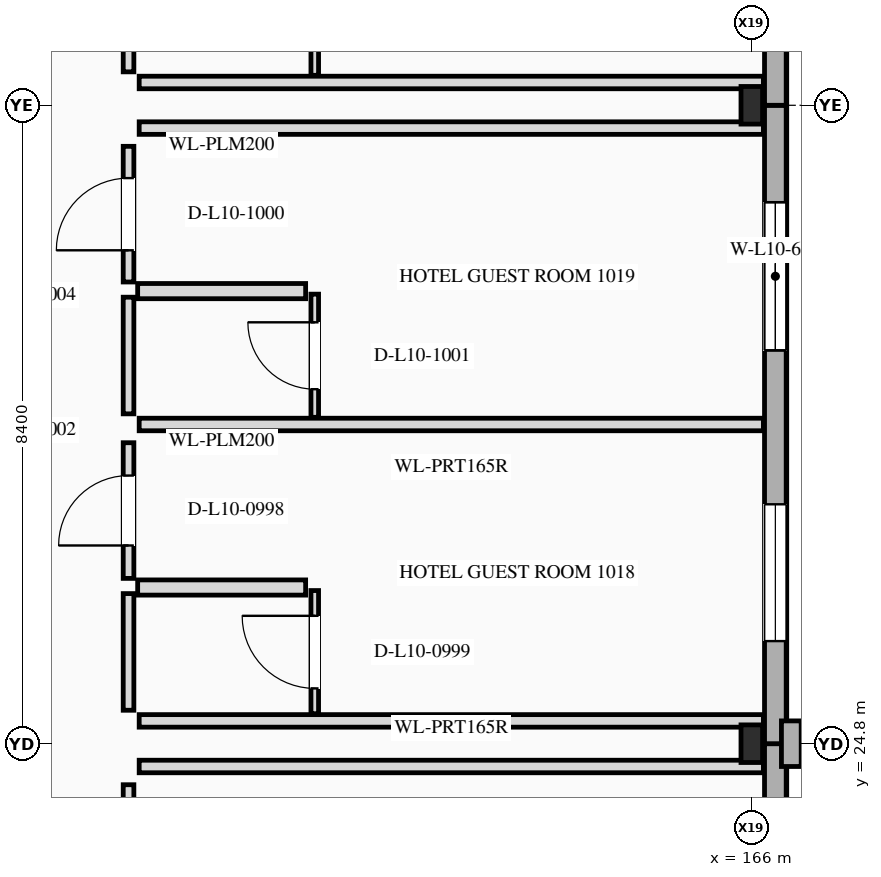
"""IFC4 building model, lengths in metres.
Left out: names, types, materials, properties, quantities, classifications, styles, units other than length and angle.
Written with IfcOpenShell. Run it as: python <this file> out.ifc"""

import sys

from ifc_helpers import new_model, si_unit, direction, frame, frame_2d, origin, origin_2d, place, context, subcontext, project, spatial, rectangle, i_section, extrude, element, fill, save


model = new_model("IFC4")
c1 = context("Model", 3, precision=1e-05, world=origin(), true_north=direction((0.0, 1.0)))
c2 = subcontext(c1, "Body", "Model", "MODEL_VIEW")
j1 = project(units=[si_unit("LENGTHUNIT", "METRE"), si_unit("PLANEANGLEUNIT", "RADIAN")], contexts=[c1])
p1 = place(None, origin())
s1 = spatial("IfcSite", under=j1, at=p1, CompositionType="ELEMENT")
p2 = place(p1, origin())
s2 = spatial("IfcBuilding", under=s1, at=p2, CompositionType="ELEMENT")
p3 = place(p2, frame((0.0, 0.0, 41.1)))
s3 = spatial("IfcBuildingStorey", under=s2, at=p3, CompositionType="ELEMENT", Elevation=41.1)
for number, where, z_axis, x_axis in (
    (1, (166.0, 24.8, 0.0), (0.0, 0.0, 1.0), (1.0, 0.0, 0.0)),
    (2, (166.0, 33.2, 0.0), (0.0, 0.0, 1.0), (1.0, 0.0, 0.0)),
):
    element("IfcColumn", number, at=place(p3, frame(where, z_axis=z_axis, x_axis=x_axis)), inside=s3, PredefinedType="COLUMN", context=c2, shape_type="SweptSolid", body=[
        extrude(i_section(OverallWidth=0.284, OverallDepth=0.495, WebThickness=0.019, FlangeThickness=0.033, at=origin_2d()), origin(), (0.0, 0.0, 1.0), 3.5),
    ])
p4 = place(p3, frame((166.31, 18.8, 0.0), z_axis=(0.0, 0.0, 1.0), x_axis=(0.0, 1.0, 0.0)))
e3 = element("IfcWall", 3, at=p4, inside=s3, PredefinedType="STANDARD", context=c2, shape_type="SweptSolid", body=[
    extrude(rectangle(XDim=6.0, YDim=0.285, at=frame_2d((3.0, 0.0))), origin(), (0.0, 0.0, 1.0), 3.5),
])
p5 = place(p4, frame((2.45, 0.0, 0.85)))
e4 = element("IfcOpeningElement", 4, at=p5, cuts=e3, PredefinedType="OPENING", context=c2, shape_type="SweptSolid", body=[
    extrude(rectangle(XDim=1.1, YDim=1.5, at=frame_2d((0.55, 0.75))), frame((0.0, 0.152, 0.0), z_axis=(0.0, -1.0, 0.0), x_axis=(1.0, 0.0, 0.0)), (0.0, 0.0, 1.0), 0.305),
])
p6 = place(p3, frame((166.31, 24.8, 0.0), z_axis=(0.0, 0.0, 1.0), x_axis=(0.0, 1.0, 0.0)))
e5 = element("IfcWall", 5, at=p6, inside=s3, PredefinedType="STANDARD", context=c2, shape_type="SweptSolid", body=[
    extrude(rectangle(XDim=8.4, YDim=0.285, at=frame_2d((4.2, 0.0))), origin(), (0.0, 0.0, 1.0), 3.5),
])
p7 = place(p6, frame((1.35, 0.0, 0.85)))
e6 = element("IfcOpeningElement", 6, at=p7, cuts=e5, PredefinedType="OPENING", context=c2, shape_type="SweptSolid", body=[
    extrude(rectangle(XDim=1.8, YDim=1.8, at=frame_2d((0.9, 0.9))), frame((0.0, 0.152, 0.0), z_axis=(0.0, -1.0, 0.0), x_axis=(1.0, 0.0, 0.0)), (0.0, 0.0, 1.0), 0.305),
])
p8 = place(p6, frame((5.175, 0.0, 0.85)))
e7 = element("IfcOpeningElement", 7, at=p8, cuts=e5, PredefinedType="OPENING", context=c2, shape_type="SweptSolid", body=[
    extrude(rectangle(XDim=1.95, YDim=1.85, at=frame_2d((0.975, 0.925))), frame((0.0, 0.152, 0.0), z_axis=(0.0, -1.0, 0.0), x_axis=(1.0, 0.0, 0.0)), (0.0, 0.0, 1.0), 0.305),
])
p9 = place(p3, frame((166.52, 24.5, 0.0), z_axis=(0.0, 0.0, 1.0), x_axis=(0.0, 1.0, 0.0)))
e8 = element("IfcWall", 8, at=p9, inside=s3, PredefinedType="ELEMENTEDWALL", context=c2, shape_type="SweptSolid", body=[
    extrude(rectangle(XDim=0.6, YDim=0.26, at=frame_2d((0.3, 0.0))), origin(), (0.0, 0.0, 1.0), 3.5),
])
p10 = place(p3, frame((166.31, 33.2, 0.0), z_axis=(0.0, 0.0, 1.0), x_axis=(0.0, 1.0, 0.0)))
e9 = element("IfcWall", 9, at=p10, inside=s3, PredefinedType="STANDARD", context=c2, shape_type="SweptSolid", body=[
    extrude(rectangle(XDim=1.34, YDim=0.285, at=frame_2d((0.67, 0.0))), origin(), (0.0, 0.0, 1.0), 3.5),
])
p11 = place(p3, frame((157.8, 21.37, 0.0), z_axis=(0.0, 0.0, 1.0), x_axis=(0.0, 1.0, 0.0)))
e10 = element("IfcWall", 10, at=p11, inside=s3, PredefinedType="PARTITIONING", context=c2, shape_type="SweptSolid", body=[
    extrude(rectangle(XDim=2.89, YDim=0.14, at=frame_2d((1.445, 0.0))), origin(), (0.0, 0.0, 1.0), 2.738),
])
p12 = place(p11, frame((0.925, 0.0, 0.0)))
e11 = element("IfcOpeningElement", 11, at=p12, cuts=e10, PredefinedType="OPENING", context=c2, shape_type="SweptSolid", body=[
    extrude(rectangle(XDim=1.04, YDim=2.25, at=frame_2d((0.52, 1.125))), frame((0.0, 0.08, 0.0), z_axis=(0.0, -1.0, 0.0), x_axis=(1.0, 0.0, 0.0)), (0.0, 0.0, 1.0), 0.16),
])
p13 = place(p3, frame((157.94, 24.5, 0.0), z_axis=(0.0, 0.0, 1.0), x_axis=(1.0, 0.0, 0.0)))
e12 = element("IfcWall", 12, at=p13, inside=s3, PredefinedType="PARTITIONING", context=c2, shape_type="SweptSolid", body=[
    extrude(rectangle(XDim=8.213, YDim=0.165, at=frame_2d((4.106, 0.0))), origin(), (0.0, 0.0, 1.0), 2.57),
])
p14 = place(p3, frame((157.8, 25.24, 0.0), z_axis=(0.0, 0.0, 1.0), x_axis=(0.0, 1.0, 0.0)))
e13 = element("IfcWall", 13, at=p14, inside=s3, PredefinedType="PARTITIONING", context=c2, shape_type="SweptSolid", body=[
    extrude(rectangle(XDim=1.535, YDim=0.14, at=frame_2d((0.768, 0.0))), origin(), (0.0, 0.0, 1.0), 2.738),
])
p15 = place(p3, frame((157.8, 26.975, 0.0), z_axis=(0.0, 0.0, 1.0), x_axis=(0.0, 1.0, 0.0)))
e14 = element("IfcWall", 14, at=p15, inside=s3, PredefinedType="PARTITIONING", context=c2, shape_type="SweptSolid", body=[
    extrude(rectangle(XDim=1.785, YDim=0.14, at=frame_2d((0.893, 0.0))), origin(), (0.0, 0.0, 1.0), 2.738),
])
p16 = place(p15, frame((0.433, 0.0, 0.0)))
e15 = element("IfcOpeningElement", 15, at=p16, cuts=e14, PredefinedType="OPENING", context=c2, shape_type="SweptSolid", body=[
    extrude(rectangle(XDim=0.92, YDim=2.3, at=frame_2d((0.46, 1.15))), frame((0.0, 0.08, 0.0), z_axis=(0.0, -1.0, 0.0), x_axis=(1.0, 0.0, 0.0)), (0.0, 0.0, 1.0), 0.16),
])
for number, where, z_axis, x_axis in (
    (16, (157.94, 25.1, 0.0), (0.0, 0.0, 1.0), (1.0, 0.0, 0.0)),
    (17, (157.94, 29.0, 0.0), (0.0, 0.0, 1.0), (1.0, 0.0, 0.0)),
):
    element("IfcWall", number, at=place(p3, frame(where, z_axis=z_axis, x_axis=x_axis)), inside=s3, PredefinedType="PARTITIONING", context=c2, shape_type="SweptSolid", body=[
        extrude(rectangle(XDim=8.213, YDim=0.165, at=frame_2d((4.106, 0.0))), origin(), (0.0, 0.0, 1.0), 2.57),
    ])
p17 = place(p3, frame((157.92, 26.855, 0.0), z_axis=(0.0, 0.0, 1.0), x_axis=(1.0, 0.0, 0.0)))
e18 = element("IfcWall", 18, at=p17, inside=s3, PredefinedType="PLUMBINGWALL", context=c2, shape_type="SweptSolid", body=[
    extrude(rectangle(XDim=2.21, YDim=0.2, at=frame_2d((1.105, 0.0))), origin(), (0.0, 0.0, 1.0), 3.18),
])
p18 = place(p3, frame((160.25, 25.195, 0.0), z_axis=(0.0, 0.0, 1.0), x_axis=(0.0, 1.0, 0.0)))
e19 = element("IfcWall", 19, at=p18, inside=s3, PredefinedType="PARTITIONING", context=c2, shape_type="SweptSolid", body=[
    extrude(rectangle(XDim=1.62, YDim=0.1, at=frame_2d((0.81, 0.0))), origin(), (0.0, 0.0, 1.0), 2.738),
])
p19 = place(p18, frame((0.333, 0.0, 0.0)))
e20 = element("IfcOpeningElement", 20, at=p19, cuts=e19, PredefinedType="OPENING", context=c2, shape_type="SweptSolid", body=[
    extrude(rectangle(XDim=0.955, YDim=2.14, at=frame_2d((0.478, 1.07))), frame((0.0, 0.06, 0.0), z_axis=(0.0, -1.0, 0.0), x_axis=(1.0, 0.0, 0.0)), (0.0, 0.0, 1.0), 0.12),
])
p20 = place(p3, frame((157.8, 29.14, 0.0), z_axis=(0.0, 0.0, 1.0), x_axis=(0.0, 1.0, 0.0)))
e21 = element("IfcWall", 21, at=p20, inside=s3, PredefinedType="PARTITIONING", context=c2, shape_type="SweptSolid", body=[
    extrude(rectangle(XDim=1.535, YDim=0.14, at=frame_2d((0.768, 0.0))), origin(), (0.0, 0.0, 1.0), 2.738),
])
p21 = place(p3, frame((157.8, 30.875, 0.0), z_axis=(0.0, 0.0, 1.0), x_axis=(0.0, 1.0, 0.0)))
e22 = element("IfcWall", 22, at=p21, inside=s3, PredefinedType="PARTITIONING", context=c2, shape_type="SweptSolid", body=[
    extrude(rectangle(XDim=1.785, YDim=0.14, at=frame_2d((0.893, 0.0))), origin(), (0.0, 0.0, 1.0), 2.738),
])
p22 = place(p21, frame((0.417, 0.0, 0.0)))
e23 = element("IfcOpeningElement", 23, at=p22, cuts=e22, PredefinedType="OPENING", context=c2, shape_type="SweptSolid", body=[
    extrude(rectangle(XDim=0.95, YDim=2.3, at=frame_2d((0.475, 1.15))), frame((0.0, 0.08, 0.0), z_axis=(0.0, -1.0, 0.0), x_axis=(1.0, 0.0, 0.0)), (0.0, 0.0, 1.0), 0.16),
])
p23 = place(p3, frame((157.94, 32.9, 0.0), z_axis=(0.0, 0.0, 1.0), x_axis=(1.0, 0.0, 0.0)))
e24 = element("IfcWall", 24, at=p23, inside=s3, PredefinedType="PARTITIONING", context=c2, shape_type="SweptSolid", body=[
    extrude(rectangle(XDim=8.213, YDim=0.165, at=frame_2d((4.106, 0.0))), origin(), (0.0, 0.0, 1.0), 2.57),
])
p24 = place(p3, frame((157.92, 30.755, 0.0), z_axis=(0.0, 0.0, 1.0), x_axis=(1.0, 0.0, 0.0)))
e25 = element("IfcWall", 25, at=p24, inside=s3, PredefinedType="PLUMBINGWALL", context=c2, shape_type="SweptSolid", body=[
    extrude(rectangle(XDim=2.21, YDim=0.2, at=frame_2d((1.105, 0.0))), origin(), (0.0, 0.0, 1.0), 3.18),
])
p25 = place(p3, frame((160.25, 29.094, 0.0), z_axis=(0.0, 0.0, 1.0), x_axis=(0.0, 1.0, 0.0)))
e26 = element("IfcWall", 26, at=p25, inside=s3, PredefinedType="PARTITIONING", context=c2, shape_type="SweptSolid", body=[
    extrude(rectangle(XDim=1.621, YDim=0.1, at=frame_2d((0.81, 0.0))), origin(), (0.0, 0.0, 1.0), 2.738),
])
p26 = place(p25, frame((0.37, 0.0, 0.0)))
e27 = element("IfcOpeningElement", 27, at=p26, cuts=e26, PredefinedType="OPENING", context=c2, shape_type="SweptSolid", body=[
    extrude(rectangle(XDim=0.88, YDim=2.18, at=frame_2d((0.44, 1.09))), frame((0.0, 0.06, 0.0), z_axis=(0.0, -1.0, 0.0), x_axis=(1.0, 0.0, 0.0)), (0.0, 0.0, 1.0), 0.12),
])
p27 = place(p3, frame((157.8, 33.64, 0.0), z_axis=(0.0, 0.0, 1.0), x_axis=(0.0, 1.0, 0.0)))
e28 = element("IfcWall", 28, at=p27, inside=s3, PredefinedType="PARTITIONING", context=c2, shape_type="SweptSolid", body=[
    extrude(rectangle(XDim=1.93, YDim=0.14, at=frame_2d((0.965, 0.0))), origin(), (0.0, 0.0, 1.0), 3.18),
])
p28 = place(p3, frame((157.94, 33.5, 0.0), z_axis=(0.0, 0.0, 1.0), x_axis=(1.0, 0.0, 0.0)))
e29 = element("IfcWall", 29, at=p28, inside=s3, PredefinedType="PARTITIONING", context=c2, shape_type="SweptSolid", body=[
    extrude(rectangle(XDim=8.213, YDim=0.165, at=frame_2d((4.106, 0.0))), origin(), (0.0, 0.0, 1.0), 2.57),
])
p29 = place(p3, frame((160.25, 33.594, 0.0), z_axis=(0.0, 0.0, 1.0), x_axis=(0.0, 1.0, 0.0)))
e30 = element("IfcWall", 30, at=p29, inside=s3, PredefinedType="PARTITIONING", context=c2, shape_type="SweptSolid", body=[
    extrude(rectangle(XDim=2.016, YDim=0.1, at=frame_2d((1.008, 0.0))), origin(), (0.0, 0.0, 1.0), 3.18),
])
p30 = place(p29, frame((0.53, 0.0, 0.0)))
e31 = element("IfcOpeningElement", 31, at=p30, cuts=e30, PredefinedType="OPENING", context=c2, shape_type="SweptSolid", body=[
    extrude(rectangle(XDim=0.955, YDim=2.22, at=frame_2d((0.478, 1.11))), frame((0.0, 0.06, 0.0), z_axis=(0.0, -1.0, 0.0), x_axis=(1.0, 0.0, 0.0)), (0.0, 0.0, 1.0), 0.12),
])
p31 = place(p7, origin())
e32 = element("IfcWindow", 32, at=p31, inside=s3, PartitioningType="SINGLE_PANEL", PredefinedType="WINDOW", context=c2, shape_type="SweptSolid", body=[
    extrude(rectangle(XDim=1.8, YDim=1.8, at=frame_2d((0.9, 0.9))), frame((0.0, 0.03, 0.0), z_axis=(0.0, -1.0, 0.0), x_axis=(1.0, 0.0, 0.0)), (0.0, 0.0, 1.0), 0.06),
])
fill(e6, e32)
p32 = place(p8, origin())
e33 = element("IfcWindow", 33, at=p32, inside=s3, PartitioningType="SINGLE_PANEL", PredefinedType="WINDOW", context=c2, shape_type="SweptSolid", body=[
    extrude(rectangle(XDim=1.95, YDim=1.85, at=frame_2d((0.975, 0.925))), frame((0.0, 0.03, 0.0), z_axis=(0.0, -1.0, 0.0), x_axis=(1.0, 0.0, 0.0)), (0.0, 0.0, 1.0), 0.06),
])
fill(e7, e33)
p33 = place(p16, origin())
e34 = element("IfcDoor", 34, at=p33, inside=s3, OperationType="SINGLE_SWING_LEFT", PredefinedType="DOOR", context=c2, shape_type="SweptSolid", body=[
    extrude(rectangle(XDim=0.92, YDim=2.3, at=frame_2d((0.46, 1.15))), frame((0.0, 0.025, 0.0), z_axis=(0.0, -1.0, 0.0), x_axis=(1.0, 0.0, 0.0)), (0.0, 0.0, 1.0), 0.05),
])
fill(e15, e34)
p34 = place(p19, origin())
e35 = element("IfcDoor", 35, at=p34, inside=s3, OperationType="SINGLE_SWING_RIGHT", PredefinedType="DOOR", context=c2, shape_type="SweptSolid", body=[
    extrude(rectangle(XDim=0.955, YDim=2.14, at=frame_2d((0.478, 1.07))), frame((0.0, 0.025, 0.0), z_axis=(0.0, -1.0, 0.0), x_axis=(1.0, 0.0, 0.0)), (0.0, 0.0, 1.0), 0.05),
])
fill(e20, e35)
p35 = place(p22, origin())
e36 = element("IfcDoor", 36, at=p35, inside=s3, OperationType="SINGLE_SWING_LEFT", PredefinedType="DOOR", context=c2, shape_type="SweptSolid", body=[
    extrude(rectangle(XDim=0.95, YDim=2.3, at=frame_2d((0.475, 1.15))), frame((0.0, 0.025, 0.0), z_axis=(0.0, -1.0, 0.0), x_axis=(1.0, 0.0, 0.0)), (0.0, 0.0, 1.0), 0.05),
])
fill(e23, e36)
p36 = place(p26, origin())
e37 = element("IfcDoor", 37, at=p36, inside=s3, OperationType="SINGLE_SWING_RIGHT", PredefinedType="DOOR", context=c2, shape_type="SweptSolid", body=[
    extrude(rectangle(XDim=0.88, YDim=2.18, at=frame_2d((0.44, 1.09))), frame((0.0, 0.025, 0.0), z_axis=(0.0, -1.0, 0.0), x_axis=(1.0, 0.0, 0.0)), (0.0, 0.0, 1.0), 0.05),
])
fill(e27, e37)
save(model, sys.argv[1])
